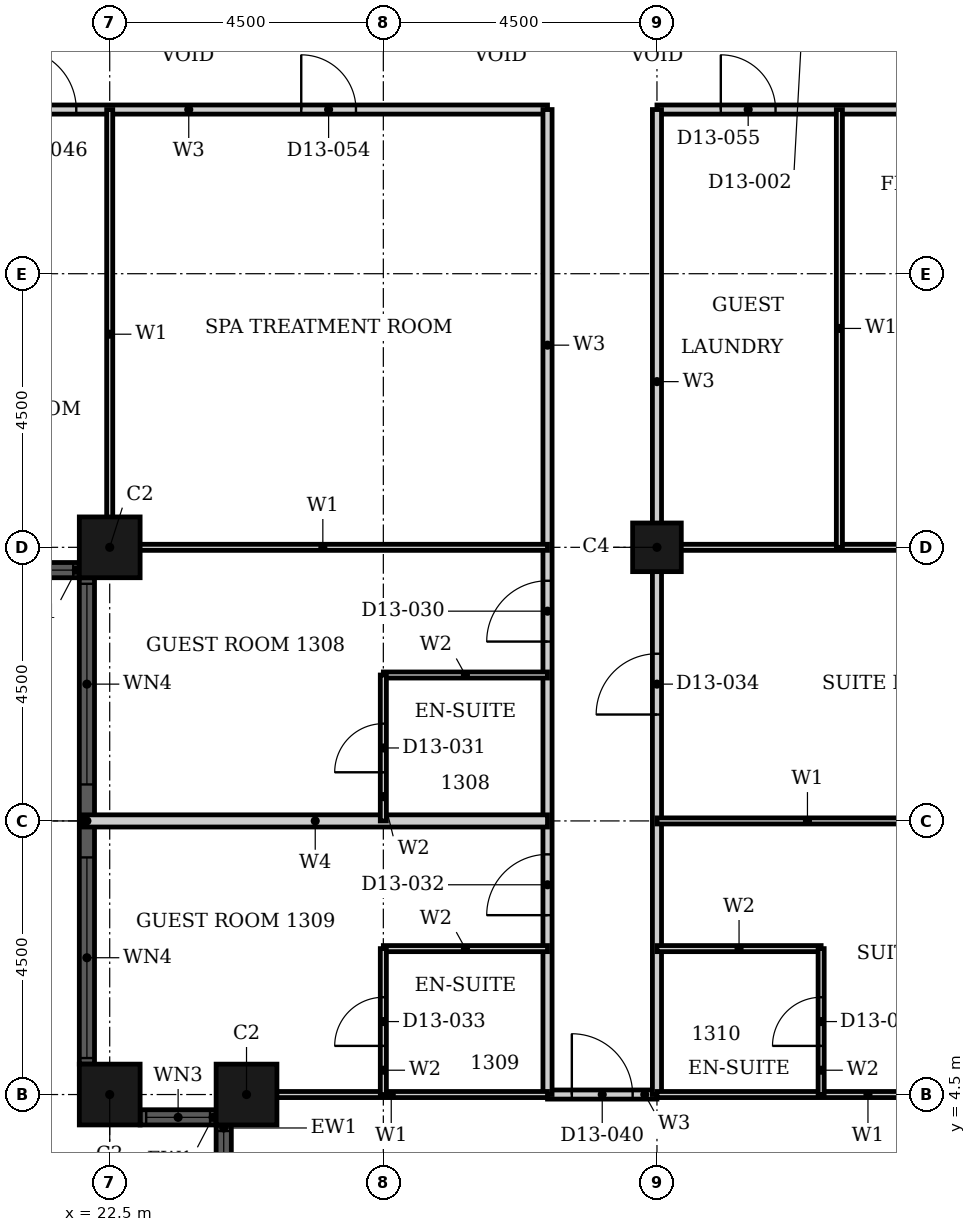
"""IFC4 building model, lengths in metres.
Left out: names, types, materials, properties, quantities, classifications, styles, units other than length and angle.
Written with IfcOpenShell. Run it as: python <this file> out.ifc"""

import sys

from ifc_helpers import new_model, si_unit, direction, frame, frame_2d, origin, origin_2d, place, context, subcontext, project, spatial, rectangle, hollow_rectangle, extrude, element, fill, save


model = new_model("IFC4")
c1 = context("Model", 3, precision=1e-05, world=origin(), true_north=direction((0.0, 1.0)))
c2 = subcontext(c1, "Body", "Model", "MODEL_VIEW")
j1 = project(units=[si_unit("LENGTHUNIT", "METRE"), si_unit("PLANEANGLEUNIT", "RADIAN")], contexts=[c1])
p1 = place(None, origin())
s1 = spatial("IfcSite", under=j1, at=p1, CompositionType="ELEMENT")
p2 = place(p1, origin())
s2 = spatial("IfcBuilding", under=s1, at=p2, CompositionType="ELEMENT")
p3 = place(p2, frame((0.0, 0.0, 60.0)))
s3 = spatial("IfcBuildingStorey", under=s2, at=p3, CompositionType="ELEMENT", Elevation=60.0)
for number, where, z_axis, x_axis in (
    (1, (22.5, 4.5, 0.0), (0.0, 0.0, 1.0), (1.0, 0.0, 0.0)),
    (2, (24.75, 4.5, 0.0), (0.0, 0.0, 1.0), (1.0, 0.0, 0.0)),
    (3, (22.5, 13.5, 0.0), (0.0, 0.0, 1.0), (1.0, 0.0, 0.0)),
):
    element("IfcColumn", number, at=place(p3, frame(where, z_axis=z_axis, x_axis=x_axis)), inside=s3, PredefinedType="COLUMN", context=c2, shape_type="SweptSolid", body=[
        extrude(hollow_rectangle(XDim=1.0, YDim=1.0, WallThickness=0.032, at=origin_2d()), origin(), (0.0, 0.0, 1.0), 3.6),
    ])
p4 = place(p3, frame((31.5, 13.5, 0.0), z_axis=(0.0, 0.0, 1.0), x_axis=(1.0, 0.0, 0.0)))
e4 = element("IfcColumn", 4, at=p4, inside=s3, PredefinedType="COLUMN", context=c2, shape_type="SweptSolid", body=[
    extrude(hollow_rectangle(XDim=0.8, YDim=0.8, WallThickness=0.025, at=origin_2d()), origin(), (0.0, 0.0, 1.0), 3.6),
])
p5 = place(p3, frame((23.0, 4.125, 0.0), z_axis=(0.0, 0.0, 1.0), x_axis=(1.0, 0.0, 0.0)))
e5 = element("IfcWall", 5, at=p5, inside=s3, PredefinedType="SOLIDWALL", context=c2, shape_type="SweptSolid", body=[
    extrude(rectangle(XDim=1.25, YDim=0.25, at=frame_2d((0.625, 0.0))), origin(), (0.0, 0.0, 1.0), 3.6),
])
p6 = place(p5, frame((0.1, 0.0, 0.9)))
e6 = element("IfcOpeningElement", 6, at=p6, cuts=e5, PredefinedType="OPENING", context=c2, shape_type="SweptSolid", body=[
    extrude(rectangle(XDim=1.05, YDim=2.08, at=frame_2d((0.525, 1.04))), frame((0.0, 0.135, 0.0), z_axis=(0.0, -1.0, 0.0), x_axis=(1.0, 0.0, 0.0)), (0.0, 0.0, 1.0), 0.27),
])
p7 = place(p3, frame((24.375, 4.0, 0.0), z_axis=(0.0, 0.0, 1.0), x_axis=(0.0, -1.0, 0.0)))
e7 = element("IfcWall", 7, at=p7, inside=s3, PredefinedType="SOLIDWALL", context=c2, shape_type="SweptSolid", body=[
    extrude(rectangle(XDim=1.25, YDim=0.25, at=frame_2d((0.625, 0.0))), origin(), (0.0, 0.0, 1.0), 3.6),
])
p8 = place(p7, frame((0.1, 0.0, 0.9)))
e8 = element("IfcOpeningElement", 8, at=p8, cuts=e7, PredefinedType="OPENING", context=c2, shape_type="SweptSolid", body=[
    extrude(rectangle(XDim=1.05, YDim=2.08, at=frame_2d((0.525, 1.04))), frame((0.0, 0.135, 0.0), z_axis=(0.0, -1.0, 0.0), x_axis=(1.0, 0.0, 0.0)), (0.0, 0.0, 1.0), 0.27),
])
p9 = place(p3, frame((18.5, 13.125, 0.0), z_axis=(0.0, 0.0, 1.0), x_axis=(1.0, 0.0, 0.0)))
e9 = element("IfcWall", 9, at=p9, inside=s3, PredefinedType="SOLIDWALL", context=c2, shape_type="SweptSolid", body=[
    extrude(rectangle(XDim=3.5, YDim=0.25, at=frame_2d((1.75, 0.0))), origin(), (0.0, 0.0, 1.0), 3.6),
])
p10 = place(p9, frame((0.1, 0.0, 0.9)))
e10 = element("IfcOpeningElement", 10, at=p10, cuts=e9, PredefinedType="OPENING", context=c2, shape_type="SweptSolid", body=[
    extrude(rectangle(XDim=3.3, YDim=2.08, at=frame_2d((1.65, 1.04))), frame((0.0, 0.135, 0.0), z_axis=(0.0, -1.0, 0.0), x_axis=(1.0, 0.0, 0.0)), (0.0, 0.0, 1.0), 0.27),
])
p11 = place(p3, frame((22.125, 13.0, 0.0), z_axis=(0.0, 0.0, 1.0), x_axis=(0.0, -1.0, 0.0)))
e11 = element("IfcWall", 11, at=p11, inside=s3, PredefinedType="SOLIDWALL", context=c2, shape_type="SweptSolid", body=[
    extrude(rectangle(XDim=8.0, YDim=0.25, at=frame_2d((4.0, 0.0))), origin(), (0.0, 0.0, 1.0), 3.6),
])
p12 = place(p11, frame((0.1, 0.0, 0.9)))
e12 = element("IfcOpeningElement", 12, at=p12, cuts=e11, PredefinedType="OPENING", context=c2, shape_type="SweptSolid", body=[
    extrude(rectangle(XDim=3.3, YDim=2.08, at=frame_2d((1.65, 1.04))), frame((0.0, 0.135, 0.0), z_axis=(0.0, -1.0, 0.0), x_axis=(1.0, 0.0, 0.0)), (0.0, 0.0, 1.0), 0.27),
])
p13 = place(p11, frame((4.6, 0.0, 0.9)))
e13 = element("IfcOpeningElement", 13, at=p13, cuts=e11, PredefinedType="OPENING", context=c2, shape_type="SweptSolid", body=[
    extrude(rectangle(XDim=3.3, YDim=2.08, at=frame_2d((1.65, 1.04))), frame((0.0, 0.135, 0.0), z_axis=(0.0, -1.0, 0.0), x_axis=(1.0, 0.0, 0.0)), (0.0, 0.0, 1.0), 0.27),
])
p14 = place(p3, frame((31.5, 20.7, 0.0), z_axis=(0.0, 0.0, 1.0), x_axis=(1.0, 0.0, 0.0)))
e14 = element("IfcWall", 14, at=p14, inside=s3, PredefinedType="PARTITIONING", context=c2, shape_type="SweptSolid", body=[
    extrude(rectangle(XDim=15.3, YDim=0.15, at=frame_2d((7.65, 0.0))), origin(), (0.0, 0.0, 1.0), 3.3),
])
p15 = place(p14, frame((11.95, 0.0, 0.0)))
e15 = element("IfcOpeningElement", 15, at=p15, cuts=e14, PredefinedType="OPENING", context=c2, shape_type="SweptSolid", body=[
    extrude(rectangle(XDim=1.0, YDim=2.1, at=frame_2d((0.5, 1.05))), frame((0.0, 0.085, 0.0), z_axis=(0.0, -1.0, 0.0), x_axis=(1.0, 0.0, 0.0)), (0.0, 0.0, 1.0), 0.17),
])
p16 = place(p14, frame((13.95, 0.0, 0.0)))
e16 = element("IfcOpeningElement", 16, at=p16, cuts=e14, PredefinedType="OPENING", context=c2, shape_type="SweptSolid", body=[
    extrude(rectangle(XDim=0.9, YDim=2.1, at=frame_2d((0.45, 1.05))), frame((0.0, 0.085, 0.0), z_axis=(0.0, -1.0, 0.0), x_axis=(1.0, 0.0, 0.0)), (0.0, 0.0, 1.0), 0.17),
])
p17 = place(p14, frame((1.05, 0.0, 0.0)))
e17 = element("IfcOpeningElement", 17, at=p17, cuts=e14, PredefinedType="OPENING", context=c2, shape_type="SweptSolid", body=[
    extrude(rectangle(XDim=0.9, YDim=2.1, at=frame_2d((0.45, 1.05))), frame((0.0, 0.085, 0.0), z_axis=(0.0, -1.0, 0.0), x_axis=(1.0, 0.0, 0.0)), (0.0, 0.0, 1.0), 0.17),
])
p18 = place(p14, frame((5.55, 0.0, 0.0)))
e18 = element("IfcOpeningElement", 18, at=p18, cuts=e14, PredefinedType="OPENING", context=c2, shape_type="SweptSolid", body=[
    extrude(rectangle(XDim=0.9, YDim=2.1, at=frame_2d((0.45, 1.05))), frame((0.0, 0.085, 0.0), z_axis=(0.0, -1.0, 0.0), x_axis=(1.0, 0.0, 0.0)), (0.0, 0.0, 1.0), 0.17),
])
p19 = place(p3, frame((16.2, 20.7, 0.0), z_axis=(0.0, 0.0, 1.0), x_axis=(1.0, 0.0, 0.0)))
e19 = element("IfcWall", 19, at=p19, inside=s3, PredefinedType="PARTITIONING", context=c2, shape_type="SweptSolid", body=[
    extrude(rectangle(XDim=13.5, YDim=0.15, at=frame_2d((6.75, 0.0))), origin(), (0.0, 0.0, 1.0), 3.3),
])
p20 = place(p19, frame((4.75, 0.0, 0.0)))
e20 = element("IfcOpeningElement", 20, at=p20, cuts=e19, PredefinedType="OPENING", context=c2, shape_type="SweptSolid", body=[
    extrude(rectangle(XDim=1.0, YDim=2.1, at=frame_2d((0.5, 1.05))), frame((0.0, 0.085, 0.0), z_axis=(0.0, -1.0, 0.0), x_axis=(1.0, 0.0, 0.0)), (0.0, 0.0, 1.0), 0.17),
])
p21 = place(p19, frame((0.45, 0.0, 0.0)))
e21 = element("IfcOpeningElement", 21, at=p21, cuts=e19, PredefinedType="OPENING", context=c2, shape_type="SweptSolid", body=[
    extrude(rectangle(XDim=0.9, YDim=2.1, at=frame_2d((0.45, 1.05))), frame((0.0, 0.085, 0.0), z_axis=(0.0, -1.0, 0.0), x_axis=(1.0, 0.0, 0.0)), (0.0, 0.0, 1.0), 0.17),
])
p22 = place(p19, frame((9.45, 0.0, 0.0)))
e22 = element("IfcOpeningElement", 22, at=p22, cuts=e19, PredefinedType="OPENING", context=c2, shape_type="SweptSolid", body=[
    extrude(rectangle(XDim=0.9, YDim=2.1, at=frame_2d((0.45, 1.05))), frame((0.0, 0.085, 0.0), z_axis=(0.0, -1.0, 0.0), x_axis=(1.0, 0.0, 0.0)), (0.0, 0.0, 1.0), 0.17),
])
p23 = place(p3, frame((29.7, 4.5, 0.0), z_axis=(0.0, 0.0, 1.0), x_axis=(1.0, 0.0, 0.0)))
e23 = element("IfcWall", 23, at=p23, inside=s3, PredefinedType="PARTITIONING", context=c2, shape_type="SweptSolid", body=[
    extrude(rectangle(XDim=1.8, YDim=0.15, at=frame_2d((0.9, 0.0))), origin(), (0.0, 0.0, 1.0), 3.3),
])
p24 = place(p23, frame((0.4, 0.0, 0.0)))
e24 = element("IfcOpeningElement", 24, at=p24, cuts=e23, PredefinedType="OPENING", context=c2, shape_type="SweptSolid", body=[
    extrude(rectangle(XDim=1.0, YDim=2.1, at=frame_2d((0.5, 1.05))), frame((0.0, 0.085, 0.0), z_axis=(0.0, -1.0, 0.0), x_axis=(1.0, 0.0, 0.0)), (0.0, 0.0, 1.0), 0.17),
])
p25 = place(p3, frame((29.7, 4.5, 0.0), z_axis=(0.0, 0.0, 1.0), x_axis=(0.0, 1.0, 0.0)))
e25 = element("IfcWall", 25, at=p25, inside=s3, PredefinedType="PARTITIONING", context=c2, shape_type="SweptSolid", body=[
    extrude(rectangle(XDim=16.2, YDim=0.15, at=frame_2d((8.1, 0.0))), origin(), (0.0, 0.0, 1.0), 3.3),
])
p26 = place(p25, frame((7.45, 0.0, 0.0)))
e26 = element("IfcOpeningElement", 26, at=p26, cuts=e25, PredefinedType="OPENING", context=c2, shape_type="SweptSolid", body=[
    extrude(rectangle(XDim=1.0, YDim=2.1, at=frame_2d((0.5, 1.05))), frame((0.0, 0.085, 0.0), z_axis=(0.0, -1.0, 0.0), x_axis=(1.0, 0.0, 0.0)), (0.0, 0.0, 1.0), 0.17),
])
p27 = place(p25, frame((2.95, 0.0, 0.0)))
e27 = element("IfcOpeningElement", 27, at=p27, cuts=e25, PredefinedType="OPENING", context=c2, shape_type="SweptSolid", body=[
    extrude(rectangle(XDim=1.0, YDim=2.1, at=frame_2d((0.5, 1.05))), frame((0.0, 0.085, 0.0), z_axis=(0.0, -1.0, 0.0), x_axis=(1.0, 0.0, 0.0)), (0.0, 0.0, 1.0), 0.17),
])
p28 = place(p3, frame((31.5, 4.5, 0.0), z_axis=(0.0, 0.0, 1.0), x_axis=(0.0, 1.0, 0.0)))
e28 = element("IfcWall", 28, at=p28, inside=s3, PredefinedType="PARTITIONING", context=c2, shape_type="SweptSolid", body=[
    extrude(rectangle(XDim=16.2, YDim=0.15, at=frame_2d((8.1, 0.0))), origin(), (0.0, 0.0, 1.0), 2.58),
])
p29 = place(p28, frame((6.25, 0.0, 0.0)))
e29 = element("IfcOpeningElement", 29, at=p29, cuts=e28, PredefinedType="OPENING", context=c2, shape_type="SweptSolid", body=[
    extrude(rectangle(XDim=1.0, YDim=2.1, at=frame_2d((0.5, 1.05))), frame((0.0, 0.085, 0.0), z_axis=(0.0, -1.0, 0.0), x_axis=(1.0, 0.0, 0.0)), (0.0, 0.0, 1.0), 0.17),
])
p30 = place(p3, frame((22.31, 13.5, 0.0), z_axis=(0.0, 0.0, 1.0), x_axis=(1.0, 0.0, 0.0)))
e30 = element("IfcWall", 30, at=p30, inside=s3, PredefinedType="PARTITIONING", context=c2, shape_type="SweptSolid", body=[
    extrude(rectangle(XDim=7.39, YDim=0.1, at=frame_2d((3.695, 0.0))), origin(), (0.0, 0.0, 1.0), 2.38),
])
p31 = place(p3, frame((31.5, 13.5, 0.0), z_axis=(0.0, 0.0, 1.0), x_axis=(1.0, 0.0, 0.0)))
e31 = element("IfcWall", 31, at=p31, inside=s3, PredefinedType="PARTITIONING", context=c2, shape_type="SweptSolid", body=[
    extrude(rectangle(XDim=9.19, YDim=0.1, at=frame_2d((4.595, 0.0))), origin(), (0.0, 0.0, 1.0), 2.38),
])
p32 = place(p3, frame((24.56, 4.5, 0.0), z_axis=(0.0, 0.0, 1.0), x_axis=(1.0, 0.0, 0.0)))
e32 = element("IfcWall", 32, at=p32, inside=s3, PredefinedType="PARTITIONING", context=c2, shape_type="SweptSolid", body=[
    extrude(rectangle(XDim=5.14, YDim=0.1, at=frame_2d((2.57, 0.0))), origin(), (0.0, 0.0, 1.0), 3.3),
])
p33 = place(p3, frame((31.5, 4.5, 0.0), z_axis=(0.0, 0.0, 1.0), x_axis=(1.0, 0.0, 0.0)))
e33 = element("IfcWall", 33, at=p33, inside=s3, PredefinedType="PARTITIONING", context=c2, shape_type="SweptSolid", body=[
    extrude(rectangle(XDim=6.94, YDim=0.1, at=frame_2d((3.47, 0.0))), origin(), (0.0, 0.0, 1.0), 3.3),
])
p34 = place(p3, frame((31.5, 9.0, 0.0), z_axis=(0.0, 0.0, 1.0), x_axis=(1.0, 0.0, 0.0)))
e34 = element("IfcWall", 34, at=p34, inside=s3, PredefinedType="PARTITIONING", context=c2, shape_type="SweptSolid", body=[
    extrude(rectangle(XDim=9.44, YDim=0.1, at=frame_2d((4.72, 0.0))), origin(), (0.0, 0.0, 1.0), 3.3),
])
p35 = place(p34, frame((4.95, 0.0, 0.0)))
e35 = element("IfcOpeningElement", 35, at=p35, cuts=e34, PredefinedType="OPENING", context=c2, shape_type="SweptSolid", body=[
    extrude(rectangle(XDim=0.9, YDim=2.1, at=frame_2d((0.45, 1.05))), frame((0.0, 0.06, 0.0), z_axis=(0.0, -1.0, 0.0), x_axis=(1.0, 0.0, 0.0)), (0.0, 0.0, 1.0), 0.12),
])
p36 = place(p3, frame((22.5, 13.31, 0.0), z_axis=(0.0, 0.0, 1.0), x_axis=(0.0, 1.0, 0.0)))
e36 = element("IfcWall", 36, at=p36, inside=s3, PredefinedType="PARTITIONING", context=c2, shape_type="SweptSolid", body=[
    extrude(rectangle(XDim=7.39, YDim=0.1, at=frame_2d((3.695, 0.0))), origin(), (0.0, 0.0, 1.0), 3.3),
])
p37 = place(p3, frame((34.5, 13.5, 0.0), z_axis=(0.0, 0.0, 1.0), x_axis=(0.0, 1.0, 0.0)))
e37 = element("IfcWall", 37, at=p37, inside=s3, PredefinedType="PARTITIONING", context=c2, shape_type="SweptSolid", body=[
    extrude(rectangle(XDim=7.2, YDim=0.1, at=frame_2d((3.6, 0.0))), origin(), (0.0, 0.0, 1.0), 3.3),
])
p38 = place(p3, frame((22.06, 9.0, 0.0), z_axis=(0.0, 0.0, 1.0), x_axis=(1.0, 0.0, 0.0)))
e38 = element("IfcWall", 38, at=p38, inside=s3, PredefinedType="PARTITIONING", context=c2, shape_type="SweptSolid", body=[
    extrude(rectangle(XDim=7.64, YDim=0.2, at=frame_2d((3.82, 0.0))), origin(), (0.0, 0.0, 1.0), 3.3),
])
for number, where, z_axis, x_axis in (
    (39, (27.0, 11.4, 0.0), (0.0, 0.0, 1.0), (1.0, 0.0, 0.0)),
    (40, (27.0, 6.9, 0.0), (0.0, 0.0, 1.0), (1.0, 0.0, 0.0)),
    (41, (31.5, 6.9, 0.0), (0.0, 0.0, 1.0), (1.0, 0.0, 0.0)),
):
    element("IfcWall", number, at=place(p3, frame(where, z_axis=z_axis, x_axis=x_axis)), inside=s3, PredefinedType="PARTITIONING", context=c2, shape_type="SweptSolid", body=[
        extrude(rectangle(XDim=2.7, YDim=0.1, at=frame_2d((1.35, 0.0))), origin(), (0.0, 0.0, 1.0), 3.3),
    ])
p39 = place(p3, frame((27.0, 9.0, 0.0), z_axis=(0.0, 0.0, 1.0), x_axis=(0.0, 1.0, 0.0)))
e42 = element("IfcWall", 42, at=p39, inside=s3, PredefinedType="PARTITIONING", context=c2, shape_type="SweptSolid", body=[
    extrude(rectangle(XDim=2.4, YDim=0.1, at=frame_2d((1.2, 0.0))), origin(), (0.0, 0.0, 1.0), 2.58),
])
p40 = place(p39, frame((0.8, 0.0, 0.0)))
e43 = element("IfcOpeningElement", 43, at=p40, cuts=e42, PredefinedType="OPENING", context=c2, shape_type="SweptSolid", body=[
    extrude(rectangle(XDim=0.8, YDim=2.1, at=frame_2d((0.4, 1.05))), frame((0.0, 0.06, 0.0), z_axis=(0.0, -1.0, 0.0), x_axis=(1.0, 0.0, 0.0)), (0.0, 0.0, 1.0), 0.12),
])
p41 = place(p3, frame((27.0, 4.5, 0.0), z_axis=(0.0, 0.0, 1.0), x_axis=(0.0, 1.0, 0.0)))
e44 = element("IfcWall", 44, at=p41, inside=s3, PredefinedType="PARTITIONING", context=c2, shape_type="SweptSolid", body=[
    extrude(rectangle(XDim=2.4, YDim=0.1, at=frame_2d((1.2, 0.0))), origin(), (0.0, 0.0, 1.0), 2.58),
])
p42 = place(p41, frame((0.8, 0.0, 0.0)))
e45 = element("IfcOpeningElement", 45, at=p42, cuts=e44, PredefinedType="OPENING", context=c2, shape_type="SweptSolid", body=[
    extrude(rectangle(XDim=0.8, YDim=2.1, at=frame_2d((0.4, 1.05))), frame((0.0, 0.06, 0.0), z_axis=(0.0, -1.0, 0.0), x_axis=(1.0, 0.0, 0.0)), (0.0, 0.0, 1.0), 0.12),
])
p43 = place(p3, frame((34.2, 4.5, 0.0), z_axis=(0.0, 0.0, 1.0), x_axis=(0.0, 1.0, 0.0)))
e46 = element("IfcWall", 46, at=p43, inside=s3, PredefinedType="PARTITIONING", context=c2, shape_type="SweptSolid", body=[
    extrude(rectangle(XDim=2.4, YDim=0.1, at=frame_2d((1.2, 0.0))), origin(), (0.0, 0.0, 1.0), 3.3),
])
p44 = place(p43, frame((0.8, 0.0, 0.0)))
e47 = element("IfcOpeningElement", 47, at=p44, cuts=e46, PredefinedType="OPENING", context=c2, shape_type="SweptSolid", body=[
    extrude(rectangle(XDim=0.8, YDim=2.1, at=frame_2d((0.4, 1.05))), frame((0.0, 0.06, 0.0), z_axis=(0.0, -1.0, 0.0), x_axis=(1.0, 0.0, 0.0)), (0.0, 0.0, 1.0), 0.12),
])
p45 = place(p6, origin())
e48 = element("IfcWindow", 48, at=p45, inside=s3, PartitioningType="SINGLE_PANEL", PredefinedType="WINDOW", context=c2, shape_type="SweptSolid", body=[
    extrude(rectangle(XDim=1.05, YDim=2.08, at=frame_2d((0.525, 1.04))), frame((0.0, 0.03, 0.0), z_axis=(0.0, -1.0, 0.0), x_axis=(1.0, 0.0, 0.0)), (0.0, 0.0, 1.0), 0.06),
])
fill(e6, e48)
p46 = place(p8, origin())
e49 = element("IfcWindow", 49, at=p46, inside=s3, PartitioningType="SINGLE_PANEL", PredefinedType="WINDOW", context=c2, shape_type="SweptSolid", body=[
    extrude(rectangle(XDim=1.05, YDim=2.08, at=frame_2d((0.525, 1.04))), frame((0.0, 0.03, 0.0), z_axis=(0.0, -1.0, 0.0), x_axis=(1.0, 0.0, 0.0)), (0.0, 0.0, 1.0), 0.06),
])
fill(e8, e49)
p47 = place(p10, origin())
e50 = element("IfcWindow", 50, at=p47, inside=s3, PartitioningType="SINGLE_PANEL", PredefinedType="WINDOW", context=c2, shape_type="SweptSolid", body=[
    extrude(rectangle(XDim=3.3, YDim=2.08, at=frame_2d((1.65, 1.04))), frame((0.0, 0.03, 0.0), z_axis=(0.0, -1.0, 0.0), x_axis=(1.0, 0.0, 0.0)), (0.0, 0.0, 1.0), 0.06),
])
fill(e10, e50)
p48 = place(p12, origin())
e51 = element("IfcWindow", 51, at=p48, inside=s3, PartitioningType="SINGLE_PANEL", PredefinedType="WINDOW", context=c2, shape_type="SweptSolid", body=[
    extrude(rectangle(XDim=3.3, YDim=2.08, at=frame_2d((1.65, 1.04))), frame((0.0, 0.03, 0.0), z_axis=(0.0, -1.0, 0.0), x_axis=(1.0, 0.0, 0.0)), (0.0, 0.0, 1.0), 0.06),
])
fill(e12, e51)
p49 = place(p13, origin())
e52 = element("IfcWindow", 52, at=p49, inside=s3, PartitioningType="SINGLE_PANEL", PredefinedType="WINDOW", context=c2, shape_type="SweptSolid", body=[
    extrude(rectangle(XDim=3.3, YDim=2.08, at=frame_2d((1.65, 1.04))), frame((0.0, 0.03, 0.0), z_axis=(0.0, -1.0, 0.0), x_axis=(1.0, 0.0, 0.0)), (0.0, 0.0, 1.0), 0.06),
])
fill(e13, e52)
p50 = place(p26, origin())
e53 = element("IfcDoor", 53, at=p50, inside=s3, OperationType="SINGLE_SWING_RIGHT", PredefinedType="DOOR", context=c2, shape_type="SweptSolid", body=[
    extrude(rectangle(XDim=1.0, YDim=2.1, at=frame_2d((0.5, 1.05))), frame((0.0, 0.025, 0.0), z_axis=(0.0, -1.0, 0.0), x_axis=(1.0, 0.0, 0.0)), (0.0, 0.0, 1.0), 0.05),
])
fill(e26, e53)
p51 = place(p40, origin())
e54 = element("IfcDoor", 54, at=p51, inside=s3, OperationType="SINGLE_SWING_LEFT", PredefinedType="DOOR", context=c2, shape_type="SweptSolid", body=[
    extrude(rectangle(XDim=0.8, YDim=2.1, at=frame_2d((0.4, 1.05))), frame((0.0, 0.025, 0.0), z_axis=(0.0, -1.0, 0.0), x_axis=(1.0, 0.0, 0.0)), (0.0, 0.0, 1.0), 0.05),
])
fill(e43, e54)
p52 = place(p27, origin())
e55 = element("IfcDoor", 55, at=p52, inside=s3, OperationType="SINGLE_SWING_RIGHT", PredefinedType="DOOR", context=c2, shape_type="SweptSolid", body=[
    extrude(rectangle(XDim=1.0, YDim=2.1, at=frame_2d((0.5, 1.05))), frame((0.0, 0.025, 0.0), z_axis=(0.0, -1.0, 0.0), x_axis=(1.0, 0.0, 0.0)), (0.0, 0.0, 1.0), 0.05),
])
fill(e27, e55)
p53 = place(p42, origin())
e56 = element("IfcDoor", 56, at=p53, inside=s3, OperationType="SINGLE_SWING_LEFT", PredefinedType="DOOR", context=c2, shape_type="SweptSolid", body=[
    extrude(rectangle(XDim=0.8, YDim=2.1, at=frame_2d((0.4, 1.05))), frame((0.0, 0.025, 0.0), z_axis=(0.0, -1.0, 0.0), x_axis=(1.0, 0.0, 0.0)), (0.0, 0.0, 1.0), 0.05),
])
fill(e45, e56)
p54 = place(p29, origin())
e57 = element("IfcDoor", 57, at=p54, inside=s3, OperationType="SINGLE_SWING_RIGHT", PredefinedType="DOOR", context=c2, shape_type="SweptSolid", body=[
    extrude(rectangle(XDim=1.0, YDim=2.1, at=frame_2d((0.5, 1.05))), frame((0.0, 0.025, 0.0), z_axis=(0.0, -1.0, 0.0), x_axis=(1.0, 0.0, 0.0)), (0.0, 0.0, 1.0), 0.05),
])
fill(e29, e57)
p55 = place(p44, origin())
e58 = element("IfcDoor", 58, at=p55, inside=s3, OperationType="SINGLE_SWING_LEFT", PredefinedType="DOOR", context=c2, shape_type="SweptSolid", body=[
    extrude(rectangle(XDim=0.8, YDim=2.1, at=frame_2d((0.4, 1.05))), frame((0.0, 0.025, 0.0), z_axis=(0.0, -1.0, 0.0), x_axis=(1.0, 0.0, 0.0)), (0.0, 0.0, 1.0), 0.05),
])
fill(e47, e58)
p56 = place(p24, origin())
e59 = element("IfcDoor", 59, at=p56, inside=s3, OperationType="SINGLE_SWING_LEFT", PredefinedType="DOOR", context=c2, shape_type="SweptSolid", body=[
    extrude(rectangle(XDim=1.0, YDim=2.1, at=frame_2d((0.5, 1.05))), frame((0.0, 0.025, 0.0), z_axis=(0.0, -1.0, 0.0), x_axis=(1.0, 0.0, 0.0)), (0.0, 0.0, 1.0), 0.05),
])
fill(e24, e59)
p57 = place(p20, origin())
e60 = element("IfcDoor", 60, at=p57, inside=s3, OperationType="SINGLE_SWING_RIGHT", PredefinedType="DOOR", context=c2, shape_type="SweptSolid", body=[
    extrude(rectangle(XDim=1.0, YDim=2.1, at=frame_2d((0.5, 1.05))), frame((0.0, 0.025, 0.0), z_axis=(0.0, -1.0, 0.0), x_axis=(1.0, 0.0, 0.0)), (0.0, 0.0, 1.0), 0.05),
])
fill(e20, e60)
p58 = place(p22, origin())
e61 = element("IfcDoor", 61, at=p58, inside=s3, OperationType="SINGLE_SWING_RIGHT", PredefinedType="DOOR", context=c2, shape_type="SweptSolid", body=[
    extrude(rectangle(XDim=0.9, YDim=2.1, at=frame_2d((0.45, 1.05))), frame((0.0, 0.025, 0.0), z_axis=(0.0, -1.0, 0.0), x_axis=(1.0, 0.0, 0.0)), (0.0, 0.0, 1.0), 0.05),
])
fill(e22, e61)
p59 = place(p17, origin())
e62 = element("IfcDoor", 62, at=p59, inside=s3, OperationType="SINGLE_SWING_LEFT", PredefinedType="DOOR", context=c2, shape_type="SweptSolid", body=[
    extrude(rectangle(XDim=0.9, YDim=2.1, at=frame_2d((0.45, 1.05))), frame((0.0, 0.025, 0.0), z_axis=(0.0, -1.0, 0.0), x_axis=(1.0, 0.0, 0.0)), (0.0, 0.0, 1.0), 0.05),
])
fill(e17, e62)
save(model, sys.argv[1])
